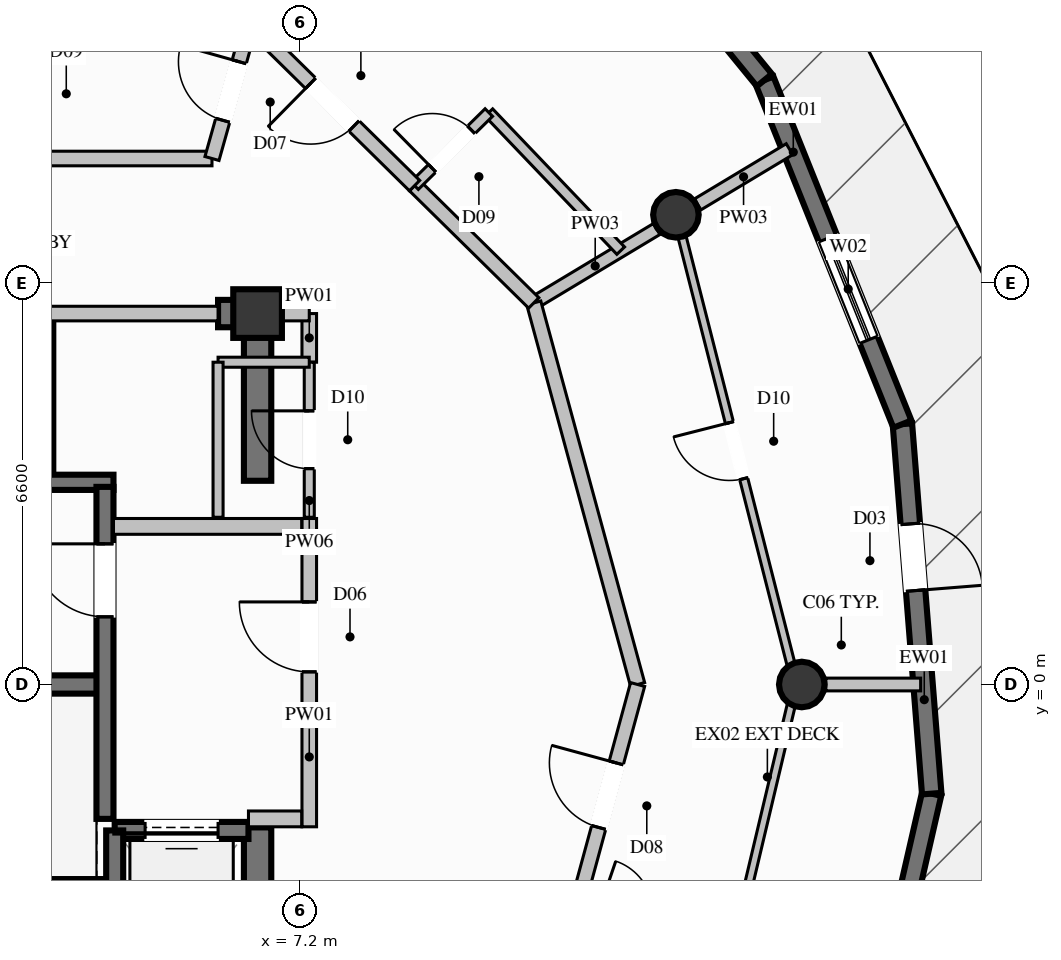
"""IFC4 building model, lengths in metres.
Left out: names, types, materials, properties, quantities, classifications, styles, units other than length and angle.
Written with IfcOpenShell. Run it as: python <this file> out.ifc"""

import sys

from ifc_helpers import new_model, si_unit, direction, frame, frame_2d, origin, origin_2d, place, context, subcontext, project, spatial, rectangle, circle, extrude, element, fill, save


model = new_model("IFC4")
c1 = context("Model", 3, precision=1e-05, world=origin(), true_north=direction((0.0, 1.0)))
c2 = subcontext(c1, "Body", "Model", "MODEL_VIEW")
j1 = project(units=[si_unit("LENGTHUNIT", "METRE"), si_unit("PLANEANGLEUNIT", "RADIAN")], contexts=[c1])
p1 = place(None, origin())
s1 = spatial("IfcSite", under=j1, at=p1, CompositionType="ELEMENT")
p2 = place(p1, origin())
s2 = spatial("IfcBuilding", under=s1, at=p2, CompositionType="ELEMENT")
p3 = place(p2, frame((0.0, 0.0, 243.0)))
s3 = spatial("IfcBuildingStorey", under=s2, at=p3, CompositionType="ELEMENT", Elevation=243.0)
p4 = place(p3, frame((6.5, 6.1, 0.0), z_axis=(0.0, 0.0, 1.0), x_axis=(1.0, 0.0, 0.0)))
e1 = element("IfcColumn", 1, at=p4, inside=s3, PredefinedType="COLUMN", context=c2, shape_type="SweptSolid", body=[
    extrude(rectangle(XDim=0.8, YDim=0.8, at=origin_2d()), origin(), (0.0, 0.0, 1.0), 3.8),
])
p5 = place(p3, frame((-3.99, 0.0, 0.0), z_axis=(0.0, 0.0, 1.0), x_axis=(1.0, 0.0, 0.0)))
e2 = element("IfcWall", 2, at=p5, inside=s3, PredefinedType="SHEAR", context=c2, shape_type="SweptSolid", body=[
    extrude(rectangle(XDim=7.98, YDim=0.3, at=frame_2d((3.99, 0.0))), origin(), (0.0, 0.0, 1.0), 3.8),
])
for number, where, z_axis, x_axis in (
    (3, (-4.13, -3.325, 0.0), (0.0, 0.0, 1.0), (1.0, 0.0, 0.0)),
    (4, (-4.13, 3.325, 0.0), (0.0, 0.0, 1.0), (1.0, 0.0, 0.0)),
):
    element("IfcWall", number, at=place(p3, frame(where, z_axis=z_axis, x_axis=x_axis)), inside=s3, PredefinedType="SOLIDWALL", context=c2, shape_type="SweptSolid", body=[
        extrude(rectangle(XDim=8.26, YDim=0.25, at=frame_2d((4.13, 0.0))), origin(), (0.0, 0.0, 1.0), 3.8),
    ])
p6 = place(p3, frame((5.85, 6.1, 0.0), z_axis=(0.0, 0.0, 1.0), x_axis=(1.0, 0.0, 0.0)))
e5 = element("IfcWall", 5, at=p6, inside=s3, PredefinedType="SHEAR", context=c2, shape_type="SweptSolid", body=[
    extrude(rectangle(XDim=0.425, YDim=0.45, at=frame_2d((0.212, 0.0))), origin(), (0.0, 0.0, 1.0), 3.8),
])
p7 = place(p3, frame((6.5, -6.325, 0.0), z_axis=(0.0, 0.0, 1.0), x_axis=(0.0, 1.0, 0.0)))
e6 = element("IfcWall", 6, at=p7, inside=s3, PredefinedType="SHEAR", context=c2, shape_type="SweptSolid", body=[
    extrude(rectangle(XDim=3.975, YDim=0.45, at=frame_2d((1.987, 0.0))), origin(), (0.0, 0.0, 1.0), 3.8),
])
p8 = place(p3, frame((6.5, 3.35, 0.0), z_axis=(0.0, 0.0, 1.0), x_axis=(0.0, 1.0, 0.0)))
e7 = element("IfcWall", 7, at=p8, inside=s3, PredefinedType="SHEAR", context=c2, shape_type="SweptSolid", body=[
    extrude(rectangle(XDim=2.975, YDim=0.45, at=frame_2d((1.487, 0.0))), origin(), (0.0, 0.0, 1.0), 3.8),
])
for number, where, z_axis, x_axis in (
    (8, (15.45, 0.0, 0.0), (0.0, 0.0, 1.0), (1.0, 0.0, 0.0)),
    (9, (13.38, 7.725, 0.0), (0.0, 0.0, 1.0), (1.0, 0.0, 0.0)),
):
    element("IfcColumn", number, at=place(p3, frame(where, z_axis=z_axis, x_axis=x_axis)), inside=s3, PredefinedType="COLUMN", context=c2, shape_type="SweptSolid", body=[
        extrude(circle(Radius=0.375, at=origin_2d()), origin(), (0.0, 0.0, 1.0), 3.8),
    ])
p9 = place(p3, frame((17.587, -1.795, 0.0), z_axis=(0.0, 0.0, 1.0), x_axis=(-0.223174159959, -0.974778587335, 0.0)))
e10 = element("IfcWall", 10, at=p9, inside=s3, PredefinedType="SOLIDWALL", context=c2, shape_type="SweptSolid", body=[
    extrude(rectangle(XDim=6.053, YDim=0.32, at=frame_2d((3.026, 0.0))), origin(), (0.0, 0.0, 1.0), 3.57),
])
p10 = place(p9, frame((2.126, 0.0, 0.35)))
e11 = element("IfcOpeningElement", 11, at=p10, cuts=e10, PredefinedType="OPENING", context=c2, shape_type="SweptSolid", body=[
    extrude(rectangle(XDim=1.8, YDim=2.6, at=frame_2d((0.9, 1.3))), frame((0.0, 0.17, 0.0), z_axis=(0.0, -1.0, 0.0), x_axis=(1.0, 0.0, 0.0)), (0.0, 0.0, 1.0), 0.34),
])
p11 = place(p3, frame((17.105, 4.282, 0.0), z_axis=(0.0, 0.0, 1.0), x_axis=(0.079057550351, -0.996870053584, 0.0)))
e12 = element("IfcWall", 12, at=p11, inside=s3, PredefinedType="SOLIDWALL", context=c2, shape_type="SweptSolid", body=[
    extrude(rectangle(XDim=6.096, YDim=0.32, at=frame_2d((3.048, 0.0))), origin(), (0.0, 0.0, 1.0), 3.57),
])
p12 = place(p11, frame((1.646, 0.0, 0.0)))
e13 = element("IfcOpeningElement", 13, at=p12, cuts=e12, PredefinedType="OPENING", context=c2, shape_type="SweptSolid", body=[
    extrude(rectangle(XDim=1.1, YDim=2.2, at=frame_2d((0.55, 1.1))), frame((0.0, 0.17, 0.0), z_axis=(0.0, -1.0, 0.0), x_axis=(1.0, 0.0, 0.0)), (0.0, 0.0, 1.0), 0.34),
])
p13 = place(p3, frame((14.835, 9.939, 0.0), z_axis=(0.0, 0.0, 1.0), x_axis=(0.372412492589, -0.928067311871, 0.0)))
e14 = element("IfcWall", 14, at=p13, inside=s3, PredefinedType="SOLIDWALL", context=c2, shape_type="SweptSolid", body=[
    extrude(rectangle(XDim=6.095, YDim=0.32, at=frame_2d((3.048, 0.0))), origin(), (0.0, 0.0, 1.0), 3.57),
])
p14 = place(p13, frame((2.802, 0.0, 0.35)))
e15 = element("IfcOpeningElement", 15, at=p14, cuts=e14, PredefinedType="OPENING", context=c2, shape_type="SweptSolid", body=[
    extrude(rectangle(XDim=1.8, YDim=2.6, at=frame_2d((0.9, 1.3))), frame((0.0, 0.17, 0.0), z_axis=(0.0, -1.0, 0.0), x_axis=(1.0, 0.0, 0.0)), (0.0, 0.0, 1.0), 0.34),
])
p15 = place(p3, frame((11.001, 14.623, 0.0), z_axis=(0.0, 0.0, 1.0), x_axis=(0.633391522875, -0.773831492478, 0.0)))
e16 = element("IfcWall", 16, at=p15, inside=s3, PredefinedType="SOLIDWALL", context=c2, shape_type="SweptSolid", body=[
    extrude(rectangle(XDim=6.053, YDim=0.32, at=frame_2d((3.027, 0.0))), origin(), (0.0, 0.0, 1.0), 3.57),
])
p16 = place(p15, frame((2.127, 0.0, 0.35)))
e17 = element("IfcOpeningElement", 17, at=p16, cuts=e16, PredefinedType="OPENING", context=c2, shape_type="SweptSolid", body=[
    extrude(rectangle(XDim=1.8, YDim=2.6, at=frame_2d((0.9, 1.3))), frame((0.0, 0.17, 0.0), z_axis=(0.0, -1.0, 0.0), x_axis=(1.0, 0.0, 0.0)), (0.0, 0.0, 1.0), 0.34),
])
p17 = place(p3, frame((3.0, 3.5, 0.0), z_axis=(0.0, 0.0, 1.0), x_axis=(0.0, 1.0, 0.0)))
e18 = element("IfcWall", 18, at=p17, inside=s3, PredefinedType="SOLIDWALL", context=c2, shape_type="SweptSolid", body=[
    extrude(rectangle(XDim=2.5, YDim=0.28, at=frame_2d((1.25, 0.0))), origin(), (0.0, 0.0, 1.0), 3.57),
])
p18 = place(p3, frame((6.35, -2.4, 0.0), z_axis=(0.0, 0.0, 1.0), x_axis=(-1.0, 0.0, 0.0)))
e19 = element("IfcWall", 19, at=p18, inside=s3, PredefinedType="SOLIDWALL", context=c2, shape_type="SweptSolid", body=[
    extrude(rectangle(XDim=2.2, YDim=0.28, at=frame_2d((1.1, 0.0))), origin(), (0.0, 0.0, 1.0), 3.57),
])
p19 = place(p18, frame((0.5, 0.0, 0.0)))
e20 = element("IfcOpeningElement", 20, at=p19, cuts=e19, PredefinedType="OPENING", context=c2, shape_type="SweptSolid", body=[
    extrude(rectangle(XDim=1.2, YDim=2.2, at=frame_2d((0.6, 1.1))), frame((0.0, 0.15, 0.0), z_axis=(0.0, -1.0, 0.0), x_axis=(1.0, 0.0, 0.0)), (0.0, 0.0, 1.0), 0.3),
])
p20 = place(p3, frame((4.15, -2.4, 0.0), z_axis=(0.0, 0.0, 1.0), x_axis=(0.0, -1.0, 0.0)))
e21 = element("IfcWall", 21, at=p20, inside=s3, PredefinedType="SOLIDWALL", context=c2, shape_type="SweptSolid", body=[
    extrude(rectangle(XDim=2.7, YDim=0.28, at=frame_2d((1.35, 0.0))), origin(), (0.0, 0.0, 1.0), 3.57),
])
p21 = place(p3, frame((3.99, -2.21, 0.0), z_axis=(0.0, 0.0, 1.0), x_axis=(0.0, 1.0, 0.0)))
e22 = element("IfcWall", 22, at=p21, inside=s3, PredefinedType="SOLIDWALL", context=c2, shape_type="SweptSolid", body=[
    extrude(rectangle(XDim=5.46, YDim=0.28, at=frame_2d((2.73, 0.0))), origin(), (0.0, 0.0, 1.0), 3.57),
])
p22 = place(p21, frame((3.323, 0.0, 0.0)))
e23 = element("IfcOpeningElement", 23, at=p22, cuts=e22, PredefinedType="OPENING", context=c2, shape_type="SweptSolid", body=[
    extrude(rectangle(XDim=1.2, YDim=2.2, at=frame_2d((0.6, 1.1))), frame((0.0, 0.15, 0.0), z_axis=(0.0, -1.0, 0.0), x_axis=(1.0, 0.0, 0.0)), (0.0, 0.0, 1.0), 0.3),
])
p23 = place(p3, frame((7.35, -2.34, 0.0), z_axis=(0.0, 0.0, 1.0), x_axis=(0.0, 1.0, 0.0)))
e24 = element("IfcWall", 24, at=p23, inside=s3, PredefinedType="PARTITIONING", context=c2, shape_type="SweptSolid", body=[
    extrude(rectangle(XDim=5.07, YDim=0.24, at=frame_2d((2.535, 0.0))), origin(), (0.0, 0.0, 1.0), 2.655),
])
p24 = place(p23, frame((2.548, 0.0, 0.0)))
e25 = element("IfcOpeningElement", 25, at=p24, cuts=e24, PredefinedType="OPENING", context=c2, shape_type="SweptSolid", body=[
    extrude(rectangle(XDim=1.15, YDim=2.2, at=frame_2d((0.575, 1.1))), frame((0.0, 0.13, 0.0), z_axis=(0.0, -1.0, 0.0), x_axis=(1.0, 0.0, 0.0)), (0.0, 0.0, 1.0), 0.26),
])
p25 = place(p3, frame((6.35, -2.21, 0.0), z_axis=(0.0, 0.0, 1.0), x_axis=(1.0, 0.0, 0.0)))
e26 = element("IfcWall", 26, at=p25, inside=s3, PredefinedType="PARTITIONING", context=c2, shape_type="SweptSolid", body=[
    extrude(rectangle(XDim=0.875, YDim=0.26, at=frame_2d((0.438, 0.0))), origin(), (0.0, 0.0, 1.0), 3.57),
])
p26 = place(p3, frame((4.13, 2.6, 0.0), z_axis=(0.0, 0.0, 1.0), x_axis=(1.0, 0.0, 0.0)))
e27 = element("IfcWall", 27, at=p26, inside=s3, PredefinedType="PARTITIONING", context=c2, shape_type="SweptSolid", body=[
    extrude(rectangle(XDim=3.095, YDim=0.26, at=frame_2d((1.548, 0.0))), origin(), (0.0, 0.0, 1.0), 3.57),
])
p27 = place(p3, frame((-5.75, 8.65, 0.0), z_axis=(0.0, 0.0, 1.0), x_axis=(1.0, 0.0, 0.0)))
e28 = element("IfcWall", 28, at=p27, inside=s3, PredefinedType="PARTITIONING", context=c2, shape_type="SweptSolid", body=[
    extrude(rectangle(XDim=11.5, YDim=0.24, at=frame_2d((5.75, 0.0))), origin(), (0.0, 0.0, 1.0), 3.57),
])
p28 = place(p3, frame((3.0, 6.1, 0.0), z_axis=(0.0, 0.0, 1.0), x_axis=(1.0, 0.0, 0.0)))
e29 = element("IfcWall", 29, at=p28, inside=s3, PredefinedType="PARTITIONING", context=c2, shape_type="SweptSolid", body=[
    extrude(rectangle(XDim=2.85, YDim=0.24, at=frame_2d((1.425, 0.0))), origin(), (0.0, 0.0, 1.0), 2.655),
])
p29 = place(p3, frame((7.35, 5.3, 0.0), z_axis=(0.0, 0.0, 1.0), x_axis=(0.0, 1.0, 0.0)))
e30 = element("IfcWall", 30, at=p29, inside=s3, PredefinedType="PARTITIONING", context=c2, shape_type="SweptSolid", body=[
    extrude(rectangle(XDim=0.8, YDim=0.24, at=frame_2d((0.4, 0.0))), origin(), (0.0, 0.0, 1.0), 2.655),
])
p30 = place(p3, frame((6.5, 6.1, 0.0), z_axis=(0.0, 0.0, 1.0), x_axis=(1.0, 0.0, 0.0)))
e31 = element("IfcWall", 31, at=p30, inside=s3, PredefinedType="PARTITIONING", context=c2, shape_type="SweptSolid", body=[
    extrude(rectangle(XDim=0.85, YDim=0.24, at=frame_2d((0.425, 0.0))), origin(), (0.0, 0.0, 1.0), 3.086),
])
p31 = place(p3, frame((7.35, 2.75, 0.0), z_axis=(0.0, 0.0, 1.0), x_axis=(0.0, 1.0, 0.0)))
e32 = element("IfcWall", 32, at=p31, inside=s3, PredefinedType="PARTITIONING", context=c2, shape_type="SweptSolid", body=[
    extrude(rectangle(XDim=2.55, YDim=0.165, at=frame_2d((1.275, 0.0))), origin(), (0.0, 0.0, 1.0), 3.57),
])
p32 = place(p31, frame((0.8, 0.0, 0.0)))
e33 = element("IfcOpeningElement", 33, at=p32, cuts=e32, PredefinedType="OPENING", context=c2, shape_type="SweptSolid", body=[
    extrude(rectangle(XDim=0.95, YDim=2.1, at=frame_2d((0.475, 1.05))), frame((0.0, 0.093, 0.0), z_axis=(0.0, -1.0, 0.0), x_axis=(1.0, 0.0, 0.0)), (0.0, 0.0, 1.0), 0.185),
])
p33 = place(p3, frame((7.35, 5.3, 0.0), z_axis=(0.0, 0.0, 1.0), x_axis=(-1.0, 0.0, 0.0)))
e34 = element("IfcWall", 34, at=p33, inside=s3, PredefinedType="PARTITIONING", context=c2, shape_type="SweptSolid", body=[
    extrude(rectangle(XDim=1.5, YDim=0.165, at=frame_2d((0.75, 0.0))), origin(), (0.0, 0.0, 1.0), 2.655),
])
p34 = place(p3, frame((5.85, 5.3, 0.0), z_axis=(0.0, 0.0, 1.0), x_axis=(0.0, -1.0, 0.0)))
e35 = element("IfcWall", 35, at=p34, inside=s3, PredefinedType="PARTITIONING", context=c2, shape_type="SweptSolid", body=[
    extrude(rectangle(XDim=2.55, YDim=0.165, at=frame_2d((1.275, 0.0))), origin(), (0.0, 0.0, 1.0), 2.655),
])
p35 = place(p3, frame((11.042, 6.275, 0.0), z_axis=(0.0, 0.0, 1.0), x_axis=(0.857026686246, 0.515272024335, 0.0)))
e36 = element("IfcWall", 36, at=p35, inside=s3, PredefinedType="PARTITIONING", context=c2, shape_type="SweptSolid", body=[
    extrude(rectangle(XDim=2.358, YDim=0.21, at=frame_2d((1.179, 0.0))), origin(), (0.0, 0.0, 1.0), 3.086),
])
p36 = place(p3, frame((13.737, 7.895, 0.0), z_axis=(0.0, 0.0, 1.0), x_axis=(0.857150569961, 0.515065918514, 0.0)))
e37 = element("IfcWall", 37, at=p36, inside=s3, PredefinedType="PARTITIONING", context=c2, shape_type="SweptSolid", body=[
    extrude(rectangle(XDim=1.763, YDim=0.21, at=frame_2d((0.881, 0.0))), origin(), (0.0, 0.0, 1.0), 3.57),
])
p37 = place(p3, frame((5.75, 8.65, 0.0), z_axis=(0.0, 0.0, 1.0), x_axis=(0.271110513922, 0.962548226969, 0.0)))
e38 = element("IfcWall", 38, at=p37, inside=s3, PredefinedType="PARTITIONING", context=c2, shape_type="SweptSolid", body=[
    extrude(rectangle(XDim=2.305, YDim=0.24, at=frame_2d((1.153, 0.0))), origin(), (0.0, 0.0, 1.0), 3.57),
])
p38 = place(p37, frame((0.653, 0.0, 0.0)))
e39 = element("IfcOpeningElement", 39, at=p38, cuts=e38, PredefinedType="OPENING", context=c2, shape_type="SweptSolid", body=[
    extrude(rectangle(XDim=1.0, YDim=2.2, at=frame_2d((0.5, 1.1))), frame((0.0, 0.13, 0.0), z_axis=(0.0, -1.0, 0.0), x_axis=(1.0, 0.0, 0.0)), (0.0, 0.0, 1.0), 0.26),
])
p39 = place(p3, frame((15.845, 0.0, 0.0), z_axis=(0.0, 0.0, 1.0), x_axis=(1.0, 0.0, 0.0)))
e40 = element("IfcWall", 40, at=p39, inside=s3, PredefinedType="PARTITIONING", context=c2, shape_type="SweptSolid", body=[
    extrude(rectangle(XDim=1.56, YDim=0.21, at=frame_2d((0.78, 0.0))), origin(), (0.0, 0.0, 1.0), 3.57),
])
p40 = place(p3, frame((12.75, 0.0, 0.0), z_axis=(0.0, 0.0, 1.0), x_axis=(-0.262640884433, 0.964893655189, 0.0)))
e41 = element("IfcWall", 41, at=p40, inside=s3, PredefinedType="PARTITIONING", context=c2, shape_type="SweptSolid", body=[
    extrude(rectangle(XDim=6.503, YDim=0.24, at=frame_2d((3.251, 0.0))), origin(), (0.0, 0.0, 1.0), 3.57),
])
p41 = place(p3, frame((11.759, -3.64, 0.0), z_axis=(0.0, 0.0, 1.0), x_axis=(0.2626902414, 0.964880219029, 0.0)))
e42 = element("IfcWall", 42, at=p41, inside=s3, PredefinedType="PARTITIONING", context=c2, shape_type="SweptSolid", body=[
    extrude(rectangle(XDim=3.772, YDim=0.24, at=frame_2d((1.886, 0.0))), origin(), (0.0, 0.0, 1.0), 3.57),
])
p42 = place(p41, frame((1.336, 0.0, 0.0)))
e43 = element("IfcOpeningElement", 43, at=p42, cuts=e42, PredefinedType="OPENING", context=c2, shape_type="SweptSolid", body=[
    extrude(rectangle(XDim=1.1, YDim=2.3, at=frame_2d((0.55, 1.15))), frame((0.0, 0.13, 0.0), z_axis=(0.0, -1.0, 0.0), x_axis=(1.0, 0.0, 0.0)), (0.0, 0.0, 1.0), 0.26),
])
p43 = place(p3, frame((13.516, -7.759, 0.0), z_axis=(0.0, 0.0, 1.0), x_axis=(0.230840940032, 0.972991500685, 0.0)))
e44 = element("IfcWall", 44, at=p43, inside=s3, PredefinedType="PARTITIONING", context=c2, shape_type="SweptSolid", body=[
    extrude(rectangle(XDim=7.974, YDim=0.135, at=frame_2d((3.987, 0.0))), origin(), (0.0, 0.0, 1.0), 3.139),
])
p44 = place(p43, frame((3.512, 0.0, 0.0)))
e45 = element("IfcOpeningElement", 45, at=p44, cuts=e44, PredefinedType="OPENING", context=c2, shape_type="SweptSolid", body=[
    extrude(rectangle(XDim=0.95, YDim=2.1, at=frame_2d((0.475, 1.05))), frame((0.0, 0.078, 0.0), z_axis=(0.0, -1.0, 0.0), x_axis=(1.0, 0.0, 0.0)), (0.0, 0.0, 1.0), 0.155),
])
p45 = place(p3, frame((15.357, 0.0, 0.0), z_axis=(0.0, 0.0, 1.0), x_axis=(-0.246948201866, 0.969028681513, 0.0)))
e46 = element("IfcWall", 46, at=p45, inside=s3, PredefinedType="PARTITIONING", context=c2, shape_type="SweptSolid", body=[
    extrude(rectangle(XDim=7.937, YDim=0.135, at=frame_2d((3.968, 0.0))), origin(), (0.0, 0.0, 1.0), 3.139),
])
p46 = place(p45, frame((3.493, 0.0, 0.0)))
e47 = element("IfcOpeningElement", 47, at=p46, cuts=e46, PredefinedType="OPENING", context=c2, shape_type="SweptSolid", body=[
    extrude(rectangle(XDim=0.95, YDim=2.1, at=frame_2d((0.475, 1.05))), frame((0.0, 0.078, 0.0), z_axis=(0.0, -1.0, 0.0), x_axis=(1.0, 0.0, 0.0)), (0.0, 0.0, 1.0), 0.155),
])
p47 = place(p3, frame((11.042, 6.275, 0.0), z_axis=(0.0, 0.0, 1.0), x_axis=(-0.712677423321, 0.701491903224, 0.0)))
e48 = element("IfcWall", 48, at=p47, inside=s3, PredefinedType="PARTITIONING", context=c2, shape_type="SweptSolid", body=[
    extrude(rectangle(XDim=2.75, YDim=0.24, at=frame_2d((1.375, 0.0))), origin(), (0.0, 0.0, 1.0), 3.57),
])
p48 = place(p3, frame((12.472, 7.135, 0.0), z_axis=(0.0, 0.0, 1.0), x_axis=(-0.690671718567, 0.723168429324, 0.0)))
e49 = element("IfcWall", 49, at=p48, inside=s3, PredefinedType="PLUMBINGWALL", context=c2, shape_type="SweptSolid", body=[
    extrude(rectangle(XDim=3.14, YDim=0.175, at=frame_2d((1.57, 0.0))), origin(), (0.0, 0.0, 1.0), 3.57),
])
p49 = place(p3, frame((9.082, 8.204, 0.0), z_axis=(0.0, 0.0, 1.0), x_axis=(0.712642440828, 0.701527441751, 0.0)))
e50 = element("IfcWall", 50, at=p49, inside=s3, PredefinedType="PLUMBINGWALL", context=c2, shape_type="SweptSolid", body=[
    extrude(rectangle(XDim=1.713, YDim=0.175, at=frame_2d((0.857, 0.0))), origin(), (0.0, 0.0, 1.0), 3.57),
])
p50 = place(p49, frame((0.407, 0.0, 0.0)))
e51 = element("IfcOpeningElement", 51, at=p50, cuts=e50, PredefinedType="OPENING", context=c2, shape_type="SweptSolid", body=[
    extrude(rectangle(XDim=0.9, YDim=2.1, at=frame_2d((0.45, 1.05))), frame((0.0, 0.098, 0.0), z_axis=(0.0, -1.0, 0.0), x_axis=(1.0, 0.0, 0.0)), (0.0, 0.0, 1.0), 0.195),
])
p51 = place(p3, frame((9.082, 8.204, 0.0), z_axis=(0.0, 0.0, 1.0), x_axis=(-0.712644426178, 0.70152542494, 0.0)))
e52 = element("IfcWall", 52, at=p51, inside=s3, PredefinedType="PARTITIONING", context=c2, shape_type="SweptSolid", body=[
    extrude(rectangle(XDim=3.799, YDim=0.24, at=frame_2d((1.899, 0.0))), origin(), (0.0, 0.0, 1.0), 3.57),
])
p52 = place(p51, frame((1.399, 0.0, 0.0)))
e53 = element("IfcOpeningElement", 53, at=p52, cuts=e52, PredefinedType="OPENING", context=c2, shape_type="SweptSolid", body=[
    extrude(rectangle(XDim=1.0, YDim=2.2, at=frame_2d((0.5, 1.1))), frame((0.0, 0.13, 0.0), z_axis=(0.0, -1.0, 0.0), x_axis=(1.0, 0.0, 0.0)), (0.0, 0.0, 1.0), 0.26),
])
p53 = place(p12, origin())
e54 = element("IfcDoor", 54, at=p53, inside=s3, OperationType="SINGLE_SWING_RIGHT", PredefinedType="DOOR", context=c2, shape_type="SweptSolid", body=[
    extrude(rectangle(XDim=1.1, YDim=2.2, at=frame_2d((0.55, 1.1))), frame((0.0, 0.025, 0.0), z_axis=(0.0, -1.0, 0.0), x_axis=(1.0, 0.0, 0.0)), (0.0, 0.0, 1.0), 0.05),
])
fill(e13, e54)
p54 = place(p14, origin())
e55 = element("IfcWindow", 55, at=p54, inside=s3, PartitioningType="SINGLE_PANEL", PredefinedType="WINDOW", context=c2, shape_type="SweptSolid", body=[
    extrude(rectangle(XDim=1.8, YDim=2.6, at=frame_2d((0.9, 1.3))), frame((0.0, 0.03, 0.0), z_axis=(0.0, -1.0, 0.0), x_axis=(1.0, 0.0, 0.0)), (0.0, 0.0, 1.0), 0.06),
])
fill(e15, e55)
p55 = place(p19, origin())
e56 = element("IfcDoor", 56, at=p55, inside=s3, OperationType="SLIDING_TO_LEFT", PredefinedType="DOOR", context=c2, shape_type="SweptSolid", body=[
    extrude(rectangle(XDim=1.2, YDim=2.2, at=frame_2d((0.6, 1.1))), frame((0.0, 0.025, 0.0), z_axis=(0.0, -1.0, 0.0), x_axis=(1.0, 0.0, 0.0)), (0.0, 0.0, 1.0), 0.05),
])
fill(e20, e56)
p56 = place(p22, origin())
e57 = element("IfcDoor", 57, at=p56, inside=s3, OperationType="SINGLE_SWING_RIGHT", PredefinedType="DOOR", context=c2, shape_type="SweptSolid", body=[
    extrude(rectangle(XDim=1.2, YDim=2.2, at=frame_2d((0.6, 1.1))), frame((0.0, 0.025, 0.0), z_axis=(0.0, -1.0, 0.0), x_axis=(1.0, 0.0, 0.0)), (0.0, 0.0, 1.0), 0.05),
])
fill(e23, e57)
p57 = place(p24, origin())
e58 = element("IfcDoor", 58, at=p57, inside=s3, OperationType="SINGLE_SWING_RIGHT", PredefinedType="DOOR", context=c2, shape_type="SweptSolid", body=[
    extrude(rectangle(XDim=1.15, YDim=2.2, at=frame_2d((0.575, 1.1))), frame((0.0, 0.025, 0.0), z_axis=(0.0, -1.0, 0.0), x_axis=(1.0, 0.0, 0.0)), (0.0, 0.0, 1.0), 0.05),
])
fill(e25, e58)
p58 = place(p32, origin())
e59 = element("IfcDoor", 59, at=p58, inside=s3, OperationType="SINGLE_SWING_RIGHT", PredefinedType="DOOR", context=c2, shape_type="SweptSolid", body=[
    extrude(rectangle(XDim=0.95, YDim=2.1, at=frame_2d((0.475, 1.05))), frame((0.0, 0.025, 0.0), z_axis=(0.0, -1.0, 0.0), x_axis=(1.0, 0.0, 0.0)), (0.0, 0.0, 1.0), 0.05),
])
fill(e33, e59)
p59 = place(p38, origin())
e60 = element("IfcDoor", 60, at=p59, inside=s3, OperationType="SINGLE_SWING_RIGHT", PredefinedType="DOOR", context=c2, shape_type="SweptSolid", body=[
    extrude(rectangle(XDim=1.0, YDim=2.2, at=frame_2d((0.5, 1.1))), frame((0.0, 0.025, 0.0), z_axis=(0.0, -1.0, 0.0), x_axis=(1.0, 0.0, 0.0)), (0.0, 0.0, 1.0), 0.05),
])
fill(e39, e60)
p60 = place(p42, origin())
e61 = element("IfcDoor", 61, at=p60, inside=s3, OperationType="SINGLE_SWING_RIGHT", PredefinedType="DOOR", context=c2, shape_type="SweptSolid", body=[
    extrude(rectangle(XDim=1.1, YDim=2.3, at=frame_2d((0.55, 1.15))), frame((0.0, 0.025, 0.0), z_axis=(0.0, -1.0, 0.0), x_axis=(1.0, 0.0, 0.0)), (0.0, 0.0, 1.0), 0.05),
])
fill(e43, e61)
p61 = place(p46, origin())
e62 = element("IfcDoor", 62, at=p61, inside=s3, OperationType="SINGLE_SWING_RIGHT", PredefinedType="DOOR", context=c2, shape_type="SweptSolid", body=[
    extrude(rectangle(XDim=0.95, YDim=2.1, at=frame_2d((0.475, 1.05))), frame((0.0, 0.025, 0.0), z_axis=(0.0, -1.0, 0.0), x_axis=(1.0, 0.0, 0.0)), (0.0, 0.0, 1.0), 0.05),
])
fill(e47, e62)
p62 = place(p50, origin())
e63 = element("IfcDoor", 63, at=p62, inside=s3, OperationType="SINGLE_SWING_LEFT", PredefinedType="DOOR", context=c2, shape_type="SweptSolid", body=[
    extrude(rectangle(XDim=0.9, YDim=2.1, at=frame_2d((0.45, 1.05))), frame((0.0, 0.025, 0.0), z_axis=(0.0, -1.0, 0.0), x_axis=(1.0, 0.0, 0.0)), (0.0, 0.0, 1.0), 0.05),
])
fill(e51, e63)
p63 = place(p52, origin())
e64 = element("IfcDoor", 64, at=p63, inside=s3, OperationType="SINGLE_SWING_RIGHT", PredefinedType="DOOR", context=c2, shape_type="SweptSolid", body=[
    extrude(rectangle(XDim=1.0, YDim=2.2, at=frame_2d((0.5, 1.1))), frame((0.0, 0.025, 0.0), z_axis=(0.0, -1.0, 0.0), x_axis=(1.0, 0.0, 0.0)), (0.0, 0.0, 1.0), 0.05),
])
fill(e53, e64)
save(model, sys.argv[1])
